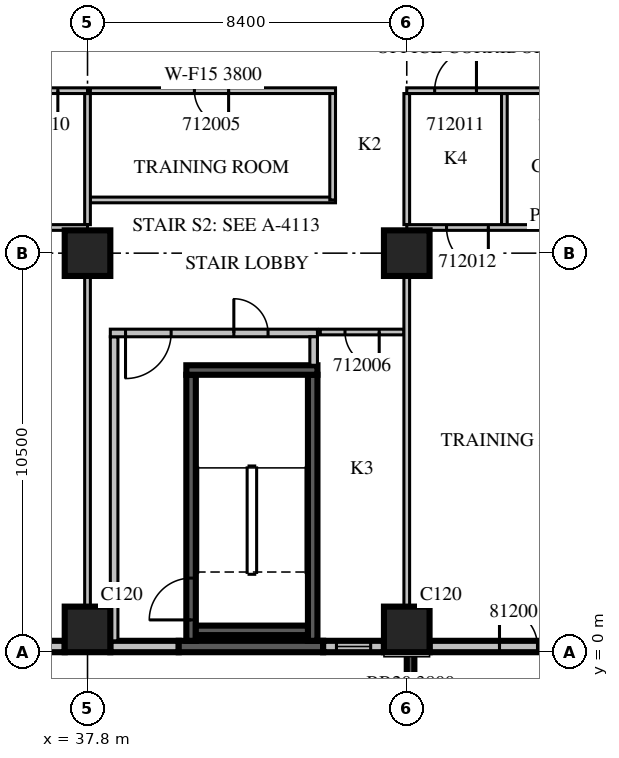
"""IFC4 building model, lengths in metres.
Left out: names, types, materials, properties, quantities, classifications, styles, units other than length and angle.
Written with IfcOpenShell. Run it as: python <this file> out.ifc"""

import sys

from ifc_helpers import new_model, si_unit, direction, frame, frame_2d, origin, origin_2d, place, context, subcontext, project, spatial, rectangle, extrude, source, transform, mapped, element, fill, save


model = new_model("IFC4")
c1 = context("Model", 3, precision=1e-05, world=origin(), true_north=direction((0.0, 1.0)))
c2 = subcontext(c1, "Body", "Model", "MODEL_VIEW")
j1 = project(units=[si_unit("LENGTHUNIT", "METRE"), si_unit("PLANEANGLEUNIT", "RADIAN")], contexts=[c1])
p1 = place(None, origin())
s1 = spatial("IfcSite", under=j1, at=p1, CompositionType="ELEMENT")
p2 = place(p1, origin())
s2 = spatial("IfcBuilding", under=s1, at=p2, CompositionType="ELEMENT")
p3 = place(p2, frame((0.0, 0.0, 61.5)))
s3 = spatial("IfcBuildingStorey", under=s2, at=p3, CompositionType="ELEMENT", Elevation=61.5)
m1 = source(origin(), c2, "Body", "SweptSolid", [
    extrude(rectangle(XDim=1.2, YDim=1.2, at=origin_2d()), origin(), (0.0, 0.0, 1.0), 4.2),
])
for number, where, z_axis, x_axis in (
    (1, (37.8, 0.6, 0.0), (0.0, 0.0, 1.0), (1.0, 0.0, 0.0)),
    (2, (46.2, 0.6, 0.0), (0.0, 0.0, 1.0), (1.0, 0.0, 0.0)),
    (3, (37.8, 10.5, 0.0), (0.0, 0.0, 1.0), (1.0, 0.0, 0.0)),
    (4, (46.2, 10.5, 0.0), (0.0, 0.0, 1.0), (1.0, 0.0, 0.0)),
):
    element("IfcColumn", number, at=place(p3, frame(where, z_axis=z_axis, x_axis=x_axis)), inside=s3, PredefinedType="COLUMN", context=c2, shape_type="MappedRepresentation", body=[
        mapped(m1, transform((0.0, 0.0, 0.0), scale=1.0)),
    ])
m2 = source(origin(), c2, "Body", "SweptSolid", [
    extrude(rectangle(XDim=3.9, YDim=0.2, at=frame_2d((1.95, 0.0))), origin(), (0.0, 0.0, 1.0), 3.8),
])
p4 = place(p3, frame((46.3, 0.0, 0.0), z_axis=(0.0, 0.0, 1.0), x_axis=(0.0, -1.0, 0.0)))
e5 = element("IfcWall", 5, at=p4, inside=s3, PredefinedType="SOLIDWALL", context=c2, shape_type="MappedRepresentation", body=[
    mapped(m2, transform((0.0, 0.0, 0.0), scale=1.0)),
])
m3 = source(origin(), c2, "Body", "SweptSolid", [
    extrude(rectangle(XDim=2.4, YDim=2.7, at=frame_2d((1.2, 1.35))), frame((0.0, 0.11, 0.0), z_axis=(0.0, -1.0, 0.0), x_axis=(1.0, 0.0, 0.0)), (0.0, 0.0, 1.0), 0.22),
])
p5 = place(p4, frame((0.75, 0.0, 0.6)))
e6 = element("IfcOpeningElement", 6, at=p5, cuts=e5, PredefinedType="OPENING", context=c2, shape_type="MappedRepresentation", body=[
    mapped(m3, transform((0.0, 0.0, 0.0), scale=1.0)),
])
m4 = source(origin(), c2, "Body", "SweptSolid", [
    extrude(rectangle(XDim=7.2, YDim=0.3, at=frame_2d((3.6, 0.0))), origin(), (0.0, 0.0, 1.0), 3.8),
])
p6 = place(p3, frame((30.0, 0.15, 0.0), z_axis=(0.0, 0.0, 1.0), x_axis=(1.0, 0.0, 0.0)))
e7 = element("IfcWall", 7, at=p6, inside=s3, PredefinedType="STANDARD", context=c2, shape_type="MappedRepresentation", body=[
    mapped(m4, transform((0.0, 0.0, 0.0), scale=1.0)),
])
m5 = source(origin(), c2, "Body", "SweptSolid", [
    extrude(rectangle(XDim=2.4, YDim=2.7, at=frame_2d((1.2, 1.35))), frame((0.0, 0.16, 0.0), z_axis=(0.0, -1.0, 0.0), x_axis=(1.0, 0.0, 0.0)), (0.0, 0.0, 1.0), 0.32),
])
p7 = place(p6, frame((2.5, 0.0, 0.6)))
e8 = element("IfcOpeningElement", 8, at=p7, cuts=e7, PredefinedType="OPENING", context=c2, shape_type="MappedRepresentation", body=[
    mapped(m5, transform((0.0, 0.0, 0.0), scale=1.0)),
])
m6 = source(origin(), c2, "Body", "SweptSolid", [
    extrude(rectangle(XDim=1.8, YDim=0.3, at=frame_2d((0.9, 0.0))), origin(), (0.0, 0.0, 1.0), 3.8),
])
p8 = place(p3, frame((38.4, 0.15, 0.0), z_axis=(0.0, 0.0, 1.0), x_axis=(1.0, 0.0, 0.0)))
e9 = element("IfcWall", 9, at=p8, inside=s3, PredefinedType="STANDARD", context=c2, shape_type="MappedRepresentation", body=[
    mapped(m6, transform((0.0, 0.0, 0.0), scale=1.0)),
])
m7 = source(origin(), c2, "Body", "SweptSolid", [
    extrude(rectangle(XDim=3.8, YDim=0.3, at=frame_2d((1.9, 0.0))), origin(), (0.0, 0.0, 1.0), 3.8),
])
p9 = place(p3, frame((40.2, 0.15, 0.0), z_axis=(0.0, 0.0, 1.0), x_axis=(1.0, 0.0, 0.0)))
e10 = element("IfcWall", 10, at=p9, inside=s3, PredefinedType="SOLIDWALL", context=c2, shape_type="MappedRepresentation", body=[
    mapped(m7, transform((0.0, 0.0, 0.0), scale=1.0)),
])
m8 = source(origin(), c2, "Body", "SweptSolid", [
    extrude(rectangle(XDim=1.6, YDim=0.3, at=frame_2d((0.8, 0.0))), origin(), (0.0, 0.0, 1.0), 3.8),
])
p10 = place(p3, frame((44.0, 0.15, 0.0), z_axis=(0.0, 0.0, 1.0), x_axis=(1.0, 0.0, 0.0)))
e11 = element("IfcWall", 11, at=p10, inside=s3, PredefinedType="STANDARD", context=c2, shape_type="MappedRepresentation", body=[
    mapped(m8, transform((0.0, 0.0, 0.0), scale=1.0)),
])
m9 = source(origin(), c2, "Body", "SweptSolid", [
    extrude(rectangle(XDim=0.9, YDim=2.7, at=frame_2d((0.45, 1.35))), frame((0.0, 0.16, 0.0), z_axis=(0.0, -1.0, 0.0), x_axis=(1.0, 0.0, 0.0)), (0.0, 0.0, 1.0), 0.32),
])
p11 = place(p10, frame((0.35, 0.0, 0.6)))
e12 = element("IfcOpeningElement", 12, at=p11, cuts=e11, PredefinedType="OPENING", context=c2, shape_type="MappedRepresentation", body=[
    mapped(m9, transform((0.0, 0.0, 0.0), scale=1.0)),
])
m10 = source(origin(), c2, "Body", "SweptSolid", [
    extrude(rectangle(XDim=4.68, YDim=0.3, at=frame_2d((2.34, 0.0))), origin(), (0.0, 0.0, 1.0), 3.8),
])
p12 = place(p3, frame((46.8, 0.15, 0.0), z_axis=(0.0, 0.0, 1.0), x_axis=(1.0, 0.0, 0.0)))
e13 = element("IfcWall", 13, at=p12, inside=s3, PredefinedType="STANDARD", context=c2, shape_type="MappedRepresentation", body=[
    mapped(m10, transform((0.0, 0.0, 0.0), scale=1.0)),
])
m11 = source(origin(), c2, "Body", "SweptSolid", [
    extrude(rectangle(XDim=1.0, YDim=2.1, at=frame_2d((0.5, 1.05))), frame((0.0, 0.16, 0.0), z_axis=(0.0, -1.0, 0.0), x_axis=(1.0, 0.0, 0.0)), (0.0, 0.0, 1.0), 0.32),
])
p13 = place(p12, frame((1.84, 0.0, 0.0)))
e14 = element("IfcOpeningElement", 14, at=p13, cuts=e13, PredefinedType="OPENING", context=c2, shape_type="MappedRepresentation", body=[
    mapped(m11, transform((0.0, 0.0, 0.0), scale=1.0)),
])
m12 = source(origin(), c2, "Body", "SweptSolid", [
    extrude(rectangle(XDim=7.0, YDim=0.25, at=frame_2d((3.5, 0.0))), origin(), (0.0, 0.0, 1.0), 3.8),
])
p14 = place(p3, frame((40.525, 0.3, 0.0), z_axis=(0.0, 0.0, 1.0), x_axis=(0.0, 1.0, 0.0)))
e15 = element("IfcWall", 15, at=p14, inside=s3, PredefinedType="SOLIDWALL", context=c2, shape_type="MappedRepresentation", body=[
    mapped(m12, transform((0.0, 0.0, 0.0), scale=1.0)),
])
m13 = source(origin(), c2, "Body", "SweptSolid", [
    extrude(rectangle(XDim=1.1, YDim=2.1, at=frame_2d((0.55, 1.05))), frame((0.0, 0.135, 0.0), z_axis=(0.0, -1.0, 0.0), x_axis=(1.0, 0.0, 0.0)), (0.0, 0.0, 1.0), 0.27),
])
p15 = place(p14, frame((0.55, 0.0, 0.0)))
e16 = element("IfcOpeningElement", 16, at=p15, cuts=e15, PredefinedType="OPENING", context=c2, shape_type="MappedRepresentation", body=[
    mapped(m13, transform((0.0, 0.0, 0.0), scale=1.0)),
])
p16 = place(p3, frame((43.725, 0.3, 0.0), z_axis=(0.0, 0.0, 1.0), x_axis=(0.0, 1.0, 0.0)))
e17 = element("IfcWall", 17, at=p16, inside=s3, PredefinedType="SOLIDWALL", context=c2, shape_type="MappedRepresentation", body=[
    mapped(m12, transform((0.0, 0.0, 0.0), scale=1.0)),
])
m14 = source(origin(), c2, "Body", "SweptSolid", [
    extrude(rectangle(XDim=3.45, YDim=0.25, at=frame_2d((1.725, 0.0))), origin(), (0.0, 0.0, 1.0), 3.8),
])
p17 = place(p3, frame((40.4, 7.425, 0.0), z_axis=(0.0, 0.0, 1.0), x_axis=(1.0, 0.0, 0.0)))
e18 = element("IfcWall", 18, at=p17, inside=s3, PredefinedType="SOLIDWALL", context=c2, shape_type="MappedRepresentation", body=[
    mapped(m14, transform((0.0, 0.0, 0.0), scale=1.0)),
])
m15 = source(origin(), c2, "Body", "SweptSolid", [
    extrude(rectangle(XDim=2.95, YDim=0.25, at=frame_2d((1.475, 0.0))), origin(), (0.0, 0.0, 1.0), 3.8),
])
p18 = place(p3, frame((40.65, 0.575, 0.0), z_axis=(0.0, 0.0, 1.0), x_axis=(1.0, 0.0, 0.0)))
e19 = element("IfcWall", 19, at=p18, inside=s3, PredefinedType="SOLIDWALL", context=c2, shape_type="MappedRepresentation", body=[
    mapped(m15, transform((0.0, 0.0, 0.0), scale=1.0)),
])
m16 = source(origin(), c2, "Body", "SweptSolid", [
    extrude(rectangle(XDim=8.0, YDim=0.2, at=frame_2d((4.0, 0.0))), origin(), (0.0, 0.0, 1.0), 3.8),
])
p19 = place(p3, frame((38.5, 0.3, 0.0), z_axis=(0.0, 0.0, 1.0), x_axis=(0.0, 1.0, 0.0)))
e20 = element("IfcWall", 20, at=p19, inside=s3, PredefinedType="PARTITIONING", context=c2, shape_type="MappedRepresentation", body=[
    mapped(m16, transform((0.0, 0.0, 0.0), scale=1.0)),
])
m17 = source(origin(), c2, "Body", "SweptSolid", [
    extrude(rectangle(XDim=5.45, YDim=0.2, at=frame_2d((2.725, 0.0))), origin(), (0.0, 0.0, 1.0), 3.8),
])
p20 = place(p3, frame((38.4, 8.4, 0.0), z_axis=(0.0, 0.0, 1.0), x_axis=(1.0, 0.0, 0.0)))
e21 = element("IfcWall", 21, at=p20, inside=s3, PredefinedType="PARTITIONING", context=c2, shape_type="MappedRepresentation", body=[
    mapped(m17, transform((0.0, 0.0, 0.0), scale=1.0)),
])
m18 = source(origin(), c2, "Body", "SweptSolid", [
    extrude(rectangle(XDim=1.2, YDim=2.1, at=frame_2d((0.6, 1.05))), frame((0.0, 0.11, 0.0), z_axis=(0.0, -1.0, 0.0), x_axis=(1.0, 0.0, 0.0)), (0.0, 0.0, 1.0), 0.22),
])
p21 = place(p20, frame((0.4, 0.0, 0.0)))
e22 = element("IfcOpeningElement", 22, at=p21, cuts=e21, PredefinedType="OPENING", context=c2, shape_type="MappedRepresentation", body=[
    mapped(m18, transform((0.0, 0.0, 0.0), scale=1.0)),
])
m19 = source(origin(), c2, "Body", "SweptSolid", [
    extrude(rectangle(XDim=0.9, YDim=2.1, at=frame_2d((0.45, 1.05))), frame((0.0, 0.11, 0.0), z_axis=(0.0, -1.0, 0.0), x_axis=(1.0, 0.0, 0.0)), (0.0, 0.0, 1.0), 0.22),
])
p22 = place(p20, frame((3.25, 0.0, 0.0)))
e23 = element("IfcOpeningElement", 23, at=p22, cuts=e21, PredefinedType="OPENING", context=c2, shape_type="MappedRepresentation", body=[
    mapped(m19, transform((0.0, 0.0, 0.0), scale=1.0)),
])
m20 = source(origin(), c2, "Body", "SweptSolid", [
    extrude(rectangle(XDim=0.75, YDim=0.2, at=frame_2d((0.375, 0.0))), origin(), (0.0, 0.0, 1.0), 3.8),
])
p23 = place(p3, frame((43.75, 7.55, 0.0), z_axis=(0.0, 0.0, 1.0), x_axis=(0.0, 1.0, 0.0)))
e24 = element("IfcWall", 24, at=p23, inside=s3, PredefinedType="PARTITIONING", context=c2, shape_type="MappedRepresentation", body=[
    mapped(m20, transform((0.0, 0.0, 0.0), scale=1.0)),
])
m21 = source(origin(), c2, "Body", "SweptSolid", [
    extrude(rectangle(XDim=6.45, YDim=0.15, at=frame_2d((3.225, 0.0))), origin(), (0.0, 0.0, 1.0), 3.8),
])
p24 = place(p3, frame((37.875, 11.9, 0.0), z_axis=(0.0, 0.0, 1.0), x_axis=(1.0, 0.0, 0.0)))
e25 = element("IfcWall", 25, at=p24, inside=s3, PredefinedType="PARTITIONING", context=c2, shape_type="MappedRepresentation", body=[
    mapped(m21, transform((0.0, 0.0, 0.0), scale=1.0)),
])
m22 = source(origin(), c2, "Body", "SweptSolid", [
    extrude(rectangle(XDim=2.875, YDim=0.15, at=frame_2d((1.438, 0.0))), origin(), (0.0, 0.0, 1.0), 3.8),
])
p25 = place(p3, frame((44.25, 11.9, 0.0), z_axis=(0.0, 0.0, 1.0), x_axis=(0.0, 1.0, 0.0)))
e26 = element("IfcWall", 26, at=p25, inside=s3, PredefinedType="PARTITIONING", context=c2, shape_type="MappedRepresentation", body=[
    mapped(m22, transform((0.0, 0.0, 0.0), scale=1.0)),
])
p26 = place(p3, frame((44.325, 14.775, 0.0), z_axis=(0.0, 0.0, 1.0), x_axis=(-1.0, 0.0, 0.0)))
e27 = element("IfcWall", 27, at=p26, inside=s3, PredefinedType="PARTITIONING", context=c2, shape_type="MappedRepresentation", body=[
    mapped(m21, transform((0.0, 0.0, 0.0), scale=1.0)),
])
m23 = source(origin(), c2, "Body", "SweptSolid", [
    extrude(rectangle(XDim=0.9, YDim=2.1, at=frame_2d((0.45, 1.05))), frame((0.0, 0.085, 0.0), z_axis=(0.0, -1.0, 0.0), x_axis=(1.0, 0.0, 0.0)), (0.0, 0.0, 1.0), 0.17),
])
p27 = place(p26, frame((2.812, 0.0, 0.0)))
e28 = element("IfcOpeningElement", 28, at=p27, cuts=e27, PredefinedType="OPENING", context=c2, shape_type="MappedRepresentation", body=[
    mapped(m23, transform((0.0, 0.0, 0.0), scale=1.0)),
])
m24 = source(origin(), c2, "Body", "SweptSolid", [
    extrude(rectangle(XDim=2.2, YDim=0.15, at=frame_2d((1.1, 0.0))), origin(), (0.0, 0.0, 1.0), 3.8),
])
p28 = place(p3, frame((46.125, 8.425, 0.0), z_axis=(0.0, 0.0, 1.0), x_axis=(-1.0, 0.0, 0.0)))
e29 = element("IfcWall", 29, at=p28, inside=s3, PredefinedType="PARTITIONING", context=c2, shape_type="MappedRepresentation", body=[
    mapped(m24, transform((0.0, 0.0, 0.0), scale=1.0)),
])
p29 = place(p28, frame((0.65, 0.0, 0.0)))
e30 = element("IfcOpeningElement", 30, at=p29, cuts=e29, PredefinedType="OPENING", context=c2, shape_type="MappedRepresentation", body=[
    mapped(m23, transform((0.0, 0.0, 0.0), scale=1.0)),
])
m25 = source(origin(), c2, "Body", "SweptSolid", [
    extrude(rectangle(XDim=8.702, YDim=0.15, at=frame_2d((4.351, 0.0))), origin(), (0.0, 0.0, 1.0), 3.8),
])
p30 = place(p3, frame((37.8, 1.199, 0.0), z_axis=(0.0, 0.0, 1.0), x_axis=(0.0, 1.0, 0.0)))
e31 = element("IfcWall", 31, at=p30, inside=s3, PredefinedType="PARTITIONING", context=c2, shape_type="MappedRepresentation", body=[
    mapped(m25, transform((0.0, 0.0, 0.0), scale=1.0)),
])
m26 = source(origin(), c2, "Body", "SweptSolid", [
    extrude(rectangle(XDim=3.45, YDim=0.15, at=frame_2d((1.725, 0.0))), origin(), (0.0, 0.0, 1.0), 3.8),
])
p31 = place(p3, frame((37.8, 11.25, 0.0), z_axis=(0.0, 0.0, 1.0), x_axis=(0.0, 1.0, 0.0)))
e32 = element("IfcWall", 32, at=p31, inside=s3, PredefinedType="PARTITIONING", context=c2, shape_type="MappedRepresentation", body=[
    mapped(m26, transform((0.0, 0.0, 0.0), scale=1.0)),
])
m27 = source(origin(), c2, "Body", "SweptSolid", [
    extrude(rectangle(XDim=8.4, YDim=0.15, at=frame_2d((4.2, 0.0))), origin(), (0.0, 0.0, 1.0), 3.3),
])
p32 = place(p3, frame((37.8, 11.175, 0.0), z_axis=(0.0, 0.0, 1.0), x_axis=(-1.0, 0.0, 0.0)))
e33 = element("IfcWall", 33, at=p32, inside=s3, PredefinedType="PARTITIONING", context=c2, shape_type="MappedRepresentation", body=[
    mapped(m27, transform((0.0, 0.0, 0.0), scale=1.0)),
])
m28 = source(origin(), c2, "Body", "SweptSolid", [
    extrude(rectangle(XDim=1.1, YDim=2.1, at=frame_2d((0.55, 1.05))), frame((0.0, 0.085, 0.0), z_axis=(0.0, -1.0, 0.0), x_axis=(1.0, 0.0, 0.0)), (0.0, 0.0, 1.0), 0.17),
])
p33 = place(p32, frame((5.833, 0.0, 0.0)))
e34 = element("IfcOpeningElement", 34, at=p33, cuts=e33, PredefinedType="OPENING", context=c2, shape_type="MappedRepresentation", body=[
    mapped(m28, transform((0.0, 0.0, 0.0), scale=1.0)),
])
p34 = place(p3, frame((48.768, 11.25, 0.0), z_axis=(0.0, 0.0, 1.0), x_axis=(0.0, 1.0, 0.0)))
e35 = element("IfcWall", 35, at=p34, inside=s3, PredefinedType="PARTITIONING", context=c2, shape_type="MappedRepresentation", body=[
    mapped(m26, transform((0.0, 0.0, 0.0), scale=1.0)),
])
p35 = place(p3, frame((46.2, 1.199, 0.0), z_axis=(0.0, 0.0, 1.0), x_axis=(0.0, 1.0, 0.0)))
e36 = element("IfcWall", 36, at=p35, inside=s3, PredefinedType="PARTITIONING", context=c2, shape_type="MappedRepresentation", body=[
    mapped(m25, transform((0.0, 0.0, 0.0), scale=1.0)),
])
p36 = place(p3, frame((46.2, 11.25, 0.0), z_axis=(0.0, 0.0, 1.0), x_axis=(0.0, 1.0, 0.0)))
e37 = element("IfcWall", 37, at=p36, inside=s3, PredefinedType="PARTITIONING", context=c2, shape_type="MappedRepresentation", body=[
    mapped(m26, transform((0.0, 0.0, 0.0), scale=1.0)),
])
m29 = source(origin(), c2, "Body", "SweptSolid", [
    extrude(rectangle(XDim=24.9, YDim=0.15, at=frame_2d((12.45, 0.0))), origin(), (0.0, 0.0, 1.0), 3.8),
])
p37 = place(p3, frame((71.1, 11.175, 0.0), z_axis=(0.0, 0.0, 1.0), x_axis=(-1.0, 0.0, 0.0)))
e38 = element("IfcWall", 38, at=p37, inside=s3, PredefinedType="PARTITIONING", context=c2, shape_type="MappedRepresentation", body=[
    mapped(m29, transform((0.0, 0.0, 0.0), scale=1.0)),
])
p38 = place(p37, frame((22.753, 0.0, 0.0)))
e39 = element("IfcOpeningElement", 39, at=p38, cuts=e38, PredefinedType="OPENING", context=c2, shape_type="MappedRepresentation", body=[
    mapped(m28, transform((0.0, 0.0, 0.0), scale=1.0)),
])
p39 = place(p37, frame((8.683, 0.0, 0.0)))
e40 = element("IfcOpeningElement", 40, at=p39, cuts=e38, PredefinedType="OPENING", context=c2, shape_type="MappedRepresentation", body=[
    mapped(m28, transform((0.0, 0.0, 0.0), scale=1.0)),
])
p40 = place(p37, frame((4.738, 0.0, 0.0)))
e41 = element("IfcOpeningElement", 41, at=p40, cuts=e38, PredefinedType="OPENING", context=c2, shape_type="MappedRepresentation", body=[
    mapped(m28, transform((0.0, 0.0, 0.0), scale=1.0)),
])
p41 = place(p3, frame((37.8, 14.775, 0.0), z_axis=(0.0, 0.0, 1.0), x_axis=(-1.0, 0.0, 0.0)))
e42 = element("IfcWall", 42, at=p41, inside=s3, PredefinedType="PARTITIONING", context=c2, shape_type="MappedRepresentation", body=[
    mapped(m27, transform((0.0, 0.0, 0.0), scale=1.0)),
])
p42 = place(p41, frame((6.146, 0.0, 0.0)))
e43 = element("IfcOpeningElement", 43, at=p42, cuts=e42, PredefinedType="OPENING", context=c2, shape_type="MappedRepresentation", body=[
    mapped(m28, transform((0.0, 0.0, 0.0), scale=1.0)),
])
p43 = place(p41, frame((3.276, 0.0, 0.0)))
e44 = element("IfcOpeningElement", 44, at=p43, cuts=e42, PredefinedType="OPENING", context=c2, shape_type="MappedRepresentation", body=[
    mapped(m23, transform((0.0, 0.0, 0.0), scale=1.0)),
])
p44 = place(p41, frame((0.781, 0.0, 0.0)))
e45 = element("IfcOpeningElement", 45, at=p44, cuts=e42, PredefinedType="OPENING", context=c2, shape_type="MappedRepresentation", body=[
    mapped(m23, transform((0.0, 0.0, 0.0), scale=1.0)),
])
p45 = place(p3, frame((71.1, 14.775, 0.0), z_axis=(0.0, 0.0, 1.0), x_axis=(-1.0, 0.0, 0.0)))
e46 = element("IfcWall", 46, at=p45, inside=s3, PredefinedType="PARTITIONING", context=c2, shape_type="MappedRepresentation", body=[
    mapped(m29, transform((0.0, 0.0, 0.0), scale=1.0)),
])
p46 = place(p45, frame((23.066, 0.0, 0.0)))
e47 = element("IfcOpeningElement", 47, at=p46, cuts=e46, PredefinedType="OPENING", context=c2, shape_type="MappedRepresentation", body=[
    mapped(m28, transform((0.0, 0.0, 0.0), scale=1.0)),
])
p47 = place(p45, frame((20.226, 0.0, 0.0)))
e48 = element("IfcOpeningElement", 48, at=p47, cuts=e46, PredefinedType="OPENING", context=c2, shape_type="MappedRepresentation", body=[
    mapped(m23, transform((0.0, 0.0, 0.0), scale=1.0)),
])
p48 = place(p45, frame((8.42, 0.0, 0.0)))
e49 = element("IfcOpeningElement", 49, at=p48, cuts=e46, PredefinedType="OPENING", context=c2, shape_type="MappedRepresentation", body=[
    mapped(m28, transform((0.0, 0.0, 0.0), scale=1.0)),
])
p49 = place(p45, frame((15.63, 0.0, 0.0)))
e50 = element("IfcOpeningElement", 50, at=p49, cuts=e46, PredefinedType="OPENING", context=c2, shape_type="MappedRepresentation", body=[
    mapped(m23, transform((0.0, 0.0, 0.0), scale=1.0)),
])
p50 = place(p45, frame((11.46, 0.0, 0.0)))
e51 = element("IfcOpeningElement", 51, at=p50, cuts=e46, PredefinedType="OPENING", context=c2, shape_type="MappedRepresentation", body=[
    mapped(m23, transform((0.0, 0.0, 0.0), scale=1.0)),
])
p51 = place(p45, frame((5.051, 0.0, 0.0)))
e52 = element("IfcOpeningElement", 52, at=p51, cuts=e46, PredefinedType="OPENING", context=c2, shape_type="MappedRepresentation", body=[
    mapped(m28, transform((0.0, 0.0, 0.0), scale=1.0)),
])
p52 = place(p45, frame((1.483, 0.0, 0.0)))
e53 = element("IfcOpeningElement", 53, at=p52, cuts=e46, PredefinedType="OPENING", context=c2, shape_type="MappedRepresentation", body=[
    mapped(m23, transform((0.0, 0.0, 0.0), scale=1.0)),
])
m30 = source(origin(), c2, "Body", "SweptSolid", [
    extrude(rectangle(XDim=0.9, YDim=2.7, at=frame_2d((0.45, 1.35))), frame((0.0, 0.03, 0.0), z_axis=(0.0, -1.0, 0.0), x_axis=(1.0, 0.0, 0.0)), (0.0, 0.0, 1.0), 0.06),
])
p53 = place(p11, origin())
e54 = element("IfcWindow", 54, at=p53, inside=s3, PartitioningType="SINGLE_PANEL", PredefinedType="WINDOW", context=c2, shape_type="MappedRepresentation", body=[
    mapped(m30, transform((0.0, 0.0, 0.0), scale=1.0)),
])
fill(e12, e54)
m31 = source(origin(), c2, "Body", "SweptSolid", [
    extrude(rectangle(XDim=1.1, YDim=2.1, at=frame_2d((0.55, 1.05))), frame((0.0, 0.025, 0.0), z_axis=(0.0, -1.0, 0.0), x_axis=(1.0, 0.0, 0.0)), (0.0, 0.0, 1.0), 0.05),
])
p54 = place(p15, origin())
e55 = element("IfcDoor", 55, at=p54, inside=s3, OperationType="SINGLE_SWING_LEFT", PredefinedType="DOOR", context=c2, shape_type="MappedRepresentation", body=[
    mapped(m31, transform((0.0, 0.0, 0.0), scale=1.0)),
])
fill(e16, e55)
m32 = source(origin(), c2, "Body", "SweptSolid", [
    extrude(rectangle(XDim=1.2, YDim=2.1, at=frame_2d((0.6, 1.05))), frame((0.0, 0.025, 0.0), z_axis=(0.0, -1.0, 0.0), x_axis=(1.0, 0.0, 0.0)), (0.0, 0.0, 1.0), 0.05),
])
p55 = place(p21, origin())
e56 = element("IfcDoor", 56, at=p55, inside=s3, OperationType="SINGLE_SWING_RIGHT", PredefinedType="DOOR", context=c2, shape_type="MappedRepresentation", body=[
    mapped(m32, transform((0.0, 0.0, 0.0), scale=1.0)),
])
fill(e22, e56)
m33 = source(origin(), c2, "Body", "SweptSolid", [
    extrude(rectangle(XDim=0.9, YDim=2.1, at=frame_2d((0.45, 1.05))), frame((0.0, 0.025, 0.0), z_axis=(0.0, -1.0, 0.0), x_axis=(1.0, 0.0, 0.0)), (0.0, 0.0, 1.0), 0.05),
])
p56 = place(p22, origin())
e57 = element("IfcDoor", 57, at=p56, inside=s3, OperationType="SINGLE_SWING_LEFT", PredefinedType="DOOR", context=c2, shape_type="MappedRepresentation", body=[
    mapped(m33, transform((0.0, 0.0, 0.0), scale=1.0)),
])
fill(e23, e57)
p57 = place(p27, origin())
e58 = element("IfcDoor", 58, at=p57, inside=s3, OperationType="SINGLE_SWING_LEFT", PredefinedType="DOOR", context=c2, shape_type="MappedRepresentation", body=[
    mapped(m33, transform((0.0, 0.0, 0.0), scale=1.0)),
])
fill(e28, e58)
p58 = place(p29, origin())
e59 = element("IfcDoor", 59, at=p58, inside=s3, OperationType="SINGLE_SWING_LEFT", PredefinedType="DOOR", context=c2, shape_type="MappedRepresentation", body=[
    mapped(m33, transform((0.0, 0.0, 0.0), scale=1.0)),
])
fill(e30, e59)
p59 = place(p44, origin())
e60 = element("IfcDoor", 60, at=p59, inside=s3, OperationType="SINGLE_SWING_LEFT", PredefinedType="DOOR", context=c2, shape_type="MappedRepresentation", body=[
    mapped(m33, transform((0.0, 0.0, 0.0), scale=1.0)),
])
fill(e45, e60)
p60 = place(p46, origin())
e61 = element("IfcDoor", 61, at=p60, inside=s3, OperationType="SINGLE_SWING_RIGHT", PredefinedType="DOOR", context=c2, shape_type="MappedRepresentation", body=[
    mapped(m31, transform((0.0, 0.0, 0.0), scale=1.0)),
])
fill(e47, e61)
p61 = place(p38, origin())
e62 = element("IfcDoor", 62, at=p61, inside=s3, OperationType="SINGLE_SWING_LEFT", PredefinedType="DOOR", context=c2, shape_type="MappedRepresentation", body=[
    mapped(m31, transform((0.0, 0.0, 0.0), scale=1.0)),
])
fill(e39, e62)
m34 = source(origin(), c2, "Body", "SweptSolid", [
    extrude(rectangle(XDim=1.0, YDim=2.1, at=frame_2d((0.5, 1.05))), frame((0.0, 0.025, 0.0), z_axis=(0.0, -1.0, 0.0), x_axis=(1.0, 0.0, 0.0)), (0.0, 0.0, 1.0), 0.05),
])
p62 = place(p13, origin())
e63 = element("IfcDoor", 63, at=p62, inside=s3, OperationType="SINGLE_SWING_LEFT", PredefinedType="DOOR", context=c2, shape_type="MappedRepresentation", body=[
    mapped(m34, transform((0.0, 0.0, 0.0), scale=1.0)),
])
fill(e14, e63)
save(model, sys.argv[1])
